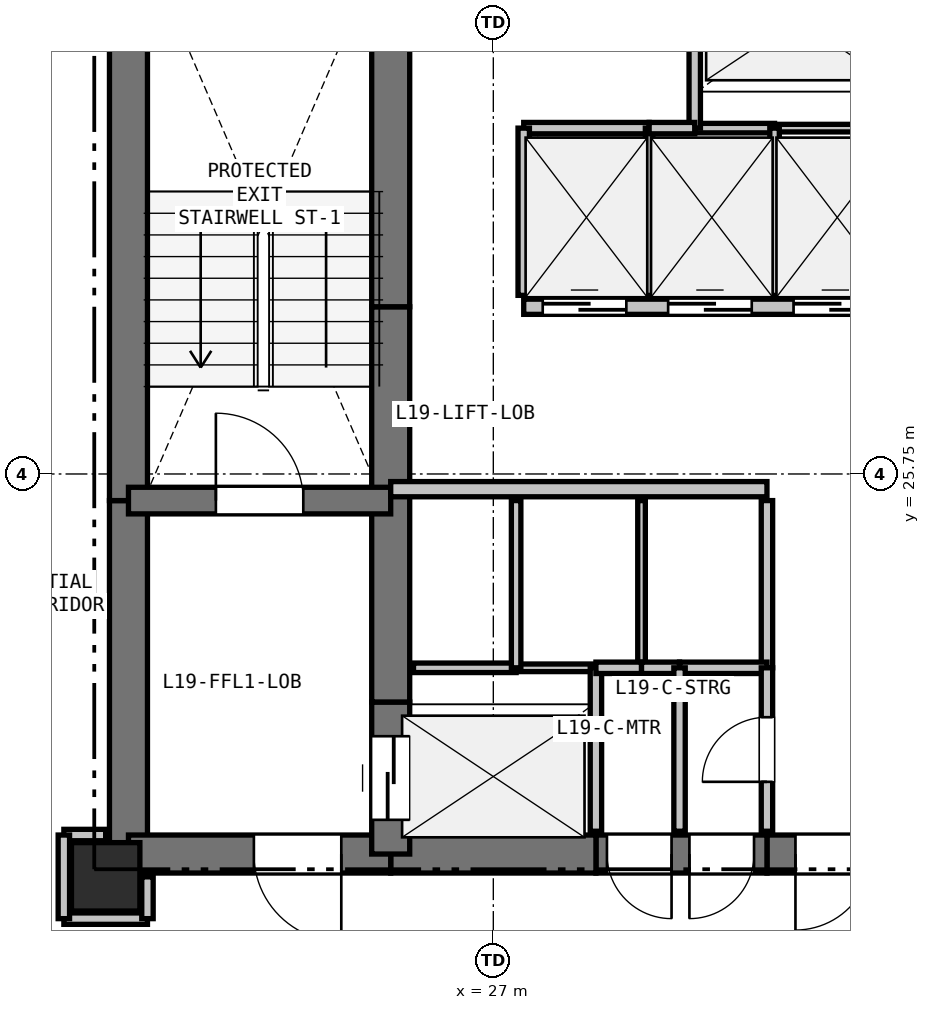
"""IFC4 building model, lengths in metres.
Left out: names, types, materials, properties, quantities, classifications, styles, units other than length and angle.
Written with IfcOpenShell. Run it as: python <this file> out.ifc"""

import sys

from ifc_helpers import new_model, si_unit, direction, frame, frame_2d, origin, origin_2d, place, context, subcontext, project, spatial, rectangle, extrude, element, fill, save


model = new_model("IFC4")
c1 = context("Model", 3, precision=1e-05, world=origin(), true_north=direction((0.0, 1.0)))
c2 = subcontext(c1, "Body", "Model", "MODEL_VIEW")
j1 = project(units=[si_unit("LENGTHUNIT", "METRE"), si_unit("PLANEANGLEUNIT", "RADIAN")], contexts=[c1])
p1 = place(None, origin())
s1 = spatial("IfcSite", under=j1, at=p1, CompositionType="ELEMENT")
p2 = place(p1, origin())
s2 = spatial("IfcBuilding", under=s1, at=p2, CompositionType="ELEMENT")
p3 = place(p2, frame((0.0, 0.0, 73.5)))
s3 = spatial("IfcBuildingStorey", under=s2, at=p3, CompositionType="ELEMENT", Elevation=73.5)
p4 = place(p3, frame((21.9, 20.45, 0.0), z_axis=(0.0, 0.0, 1.0), x_axis=(1.0, 0.0, 0.0)))
e1 = element("IfcColumn", 1, at=p4, inside=s3, PredefinedType="COLUMN", context=c2, shape_type="SweptSolid", body=[
    extrude(rectangle(XDim=0.9, YDim=0.9, at=origin_2d()), origin(), (0.0, 0.0, 1.0), 3.3),
])
p5 = place(p3, frame((22.2, 20.75, 0.0), z_axis=(0.0, 0.0, 1.0), x_axis=(0.0, 1.0, 0.0)))
e2 = element("IfcWall", 2, at=p5, inside=s3, PredefinedType="SHEAR", context=c2, shape_type="SweptSolid", body=[
    extrude(rectangle(XDim=4.65, YDim=0.5, at=frame_2d((2.325, 0.0))), origin(), (0.0, 0.0, 1.0), 3.05),
])
p6 = place(p3, frame((22.2, 25.4, 0.0), z_axis=(0.0, 0.0, 1.0), x_axis=(0.0, 1.0, 0.0)))
e3 = element("IfcWall", 3, at=p6, inside=s3, PredefinedType="SHEAR", context=c2, shape_type="SweptSolid", body=[
    extrude(rectangle(XDim=7.35, YDim=0.5, at=frame_2d((3.675, 0.0))), origin(), (0.0, 0.0, 1.0), 3.05),
])
p7 = place(p3, frame((32.35, 20.75, 0.0), z_axis=(0.0, 0.0, 1.0), x_axis=(-1.0, 0.0, 0.0)))
e4 = element("IfcWall", 4, at=p7, inside=s3, PredefinedType="SHEAR", context=c2, shape_type="SweptSolid", body=[
    extrude(rectangle(XDim=1.75, YDim=0.5, at=frame_2d((0.875, 0.0))), origin(), (0.0, 0.0, 1.0), 3.05),
])
p8 = place(p7, frame((0.375, 0.0, 0.0)))
e5 = element("IfcOpeningElement", 5, at=p8, cuts=e4, PredefinedType="OPENING", context=c2, shape_type="SweptSolid", body=[
    extrude(rectangle(XDim=1.0, YDim=2.15, at=frame_2d((0.5, 1.075))), frame((0.0, 0.26, 0.0), z_axis=(0.0, -1.0, 0.0), x_axis=(1.0, 0.0, 0.0)), (0.0, 0.0, 1.0), 0.52),
])
p9 = place(p3, frame((30.6, 20.75, 0.0), z_axis=(0.0, 0.0, 1.0), x_axis=(-1.0, 0.0, 0.0)))
e6 = element("IfcWall", 6, at=p9, inside=s3, PredefinedType="SHEAR", context=c2, shape_type="SweptSolid", body=[
    extrude(rectangle(XDim=2.25, YDim=0.5, at=frame_2d((1.125, 0.0))), origin(), (0.0, 0.0, 1.0), 3.05),
])
p10 = place(p9, frame((1.255, 0.0, 0.0)))
e7 = element("IfcOpeningElement", 7, at=p10, cuts=e6, PredefinedType="OPENING", context=c2, shape_type="SweptSolid", body=[
    extrude(rectangle(XDim=0.85, YDim=2.1, at=frame_2d((0.425, 1.05))), frame((0.0, 0.26, 0.0), z_axis=(0.0, -1.0, 0.0), x_axis=(1.0, 0.0, 0.0)), (0.0, 0.0, 1.0), 0.52),
])
p11 = place(p9, frame((0.17, 0.0, 0.0)))
e8 = element("IfcOpeningElement", 8, at=p11, cuts=e6, PredefinedType="OPENING", context=c2, shape_type="SweptSolid", body=[
    extrude(rectangle(XDim=0.85, YDim=2.1, at=frame_2d((0.425, 1.05))), frame((0.0, 0.26, 0.0), z_axis=(0.0, -1.0, 0.0), x_axis=(1.0, 0.0, 0.0)), (0.0, 0.0, 1.0), 0.52),
])
p12 = place(p3, frame((28.35, 20.75, 0.0), z_axis=(0.0, 0.0, 1.0), x_axis=(-1.0, 0.0, 0.0)))
e9 = element("IfcWall", 9, at=p12, inside=s3, PredefinedType="SHEAR", context=c2, shape_type="SweptSolid", body=[
    extrude(rectangle(XDim=2.7, YDim=0.5, at=frame_2d((1.35, 0.0))), origin(), (0.0, 0.0, 1.0), 3.05),
])
p13 = place(p3, frame((25.65, 20.75, 0.0), z_axis=(0.0, 0.0, 1.0), x_axis=(-1.0, 0.0, 0.0)))
e10 = element("IfcWall", 10, at=p13, inside=s3, PredefinedType="SHEAR", context=c2, shape_type="SweptSolid", body=[
    extrude(rectangle(XDim=3.45, YDim=0.5, at=frame_2d((1.725, 0.0))), origin(), (0.0, 0.0, 1.0), 3.05),
])
p14 = place(p13, frame((0.65, 0.0, 0.0)))
e11 = element("IfcOpeningElement", 11, at=p14, cuts=e10, PredefinedType="OPENING", context=c2, shape_type="SweptSolid", body=[
    extrude(rectangle(XDim=1.15, YDim=2.15, at=frame_2d((0.575, 1.075))), frame((0.0, 0.26, 0.0), z_axis=(0.0, -1.0, 0.0), x_axis=(1.0, 0.0, 0.0)), (0.0, 0.0, 1.0), 0.52),
])
p15 = place(p3, frame((25.65, 20.75, 0.0), z_axis=(0.0, 0.0, 1.0), x_axis=(0.0, 1.0, 0.0)))
e12 = element("IfcWall", 12, at=p15, inside=s3, PredefinedType="SHEAR", context=c2, shape_type="SweptSolid", body=[
    extrude(rectangle(XDim=2.0, YDim=0.5, at=frame_2d((1.0, 0.0))), origin(), (0.0, 0.0, 1.0), 3.05),
])
p16 = place(p15, frame((0.45, 0.0, 0.0)))
e13 = element("IfcOpeningElement", 13, at=p16, cuts=e12, PredefinedType="OPENING", context=c2, shape_type="SweptSolid", body=[
    extrude(rectangle(XDim=1.1, YDim=2.15, at=frame_2d((0.55, 1.075))), frame((0.0, 0.26, 0.0), z_axis=(0.0, -1.0, 0.0), x_axis=(1.0, 0.0, 0.0)), (0.0, 0.0, 1.0), 0.52),
])
p17 = place(p3, frame((25.65, 22.75, 0.0), z_axis=(0.0, 0.0, 1.0), x_axis=(0.0, 1.0, 0.0)))
e14 = element("IfcWall", 14, at=p17, inside=s3, PredefinedType="SHEAR", context=c2, shape_type="SweptSolid", body=[
    extrude(rectangle(XDim=2.8, YDim=0.5, at=frame_2d((1.4, 0.0))), origin(), (0.0, 0.0, 1.0), 3.05),
])
p18 = place(p3, frame((25.65, 25.55, 0.0), z_axis=(0.0, 0.0, 1.0), x_axis=(0.0, 1.0, 0.0)))
e15 = element("IfcWall", 15, at=p18, inside=s3, PredefinedType="SHEAR", context=c2, shape_type="SweptSolid", body=[
    extrude(rectangle(XDim=2.4, YDim=0.5, at=frame_2d((1.2, 0.0))), origin(), (0.0, 0.0, 1.0), 3.05),
])
p19 = place(p3, frame((25.65, 27.95, 0.0), z_axis=(0.0, 0.0, 1.0), x_axis=(0.0, 1.0, 0.0)))
e16 = element("IfcWall", 16, at=p19, inside=s3, PredefinedType="SHEAR", context=c2, shape_type="SweptSolid", body=[
    extrude(rectangle(XDim=4.8, YDim=0.5, at=frame_2d((2.4, 0.0))), origin(), (0.0, 0.0, 1.0), 3.05),
])
p20 = place(p3, frame((22.2, 25.4, 0.0), z_axis=(0.0, 0.0, 1.0), x_axis=(1.0, 0.0, 0.0)))
e17 = element("IfcWall", 17, at=p20, inside=s3, PredefinedType="SHEAR", context=c2, shape_type="SweptSolid", body=[
    extrude(rectangle(XDim=3.45, YDim=0.35, at=frame_2d((1.725, 0.0))), origin(), (0.0, 0.0, 1.0), 3.05),
])
p21 = place(p20, frame((1.15, 0.0, 0.0)))
e18 = element("IfcOpeningElement", 18, at=p21, cuts=e17, PredefinedType="OPENING", context=c2, shape_type="SweptSolid", body=[
    extrude(rectangle(XDim=1.15, YDim=2.15, at=frame_2d((0.575, 1.075))), frame((0.0, 0.185, 0.0), z_axis=(0.0, -1.0, 0.0), x_axis=(1.0, 0.0, 0.0)), (0.0, 0.0, 1.0), 0.37),
])
p22 = place(p3, frame((25.65, 25.55, 0.0), z_axis=(0.0, 0.0, 1.0), x_axis=(1.0, 0.0, 0.0)))
e19 = element("IfcWall", 19, at=p22, inside=s3, PredefinedType="PARTITIONING", context=c2, shape_type="SweptSolid", body=[
    extrude(rectangle(XDim=4.95, YDim=0.2, at=frame_2d((2.475, 0.0))), origin(), (0.0, 0.0, 1.0), 3.05),
])
p23 = place(p3, frame((27.4, 27.95, 0.0), z_axis=(0.0, 0.0, 1.0), x_axis=(1.0, 0.0, 0.0)))
e20 = element("IfcWall", 20, at=p23, inside=s3, PredefinedType="PARTITIONING", context=c2, shape_type="SweptSolid", body=[
    extrude(rectangle(XDim=4.95, YDim=0.2, at=frame_2d((2.475, 0.0))), origin(), (0.0, 0.0, 1.0), 3.05),
])
p24 = place(p23, frame((0.25, 0.0, 0.0)))
e21 = element("IfcOpeningElement", 21, at=p24, cuts=e20, PredefinedType="OPENING", context=c2, shape_type="SweptSolid", body=[
    extrude(rectangle(XDim=1.1, YDim=2.15, at=frame_2d((0.55, 1.075))), frame((0.0, 0.11, 0.0), z_axis=(0.0, -1.0, 0.0), x_axis=(1.0, 0.0, 0.0)), (0.0, 0.0, 1.0), 0.22),
])
p25 = place(p23, frame((1.9, 0.0, 0.0)))
e22 = element("IfcOpeningElement", 22, at=p25, cuts=e20, PredefinedType="OPENING", context=c2, shape_type="SweptSolid", body=[
    extrude(rectangle(XDim=1.1, YDim=2.15, at=frame_2d((0.55, 1.075))), frame((0.0, 0.11, 0.0), z_axis=(0.0, -1.0, 0.0), x_axis=(1.0, 0.0, 0.0)), (0.0, 0.0, 1.0), 0.22),
])
p26 = place(p23, frame((3.55, 0.0, 0.0)))
e23 = element("IfcOpeningElement", 23, at=p26, cuts=e20, PredefinedType="OPENING", context=c2, shape_type="SweptSolid", body=[
    extrude(rectangle(XDim=1.1, YDim=2.15, at=frame_2d((0.55, 1.075))), frame((0.0, 0.11, 0.0), z_axis=(0.0, -1.0, 0.0), x_axis=(1.0, 0.0, 0.0)), (0.0, 0.0, 1.0), 0.22),
])
p27 = place(p3, frame((25.95, 23.2, 0.0), z_axis=(0.0, 0.0, 1.0), x_axis=(1.0, 0.0, 0.0)))
e24 = element("IfcWall", 24, at=p27, inside=s3, PredefinedType="PARTITIONING", context=c2, shape_type="SweptSolid", body=[
    extrude(rectangle(XDim=1.35, YDim=0.125, at=frame_2d((0.675, 0.0))), origin(), (0.0, 0.0, 1.0), 3.05),
])
p28 = place(p3, frame((27.3, 23.2, 0.0), z_axis=(0.0, 0.0, 1.0), x_axis=(1.0, 0.0, 0.0)))
e25 = element("IfcWall", 25, at=p28, inside=s3, PredefinedType="PARTITIONING", context=c2, shape_type="SweptSolid", body=[
    extrude(rectangle(XDim=1.05, YDim=0.1, at=frame_2d((0.525, 0.0))), origin(), (0.0, 0.0, 1.0), 3.05),
])
p29 = place(p3, frame((28.35, 23.2, 0.0), z_axis=(0.0, 0.0, 1.0), x_axis=(0.0, -1.0, 0.0)))
e26 = element("IfcWall", 26, at=p29, inside=s3, PredefinedType="PARTITIONING", context=c2, shape_type="SweptSolid", body=[
    extrude(rectangle(XDim=2.15, YDim=0.15, at=frame_2d((1.075, 0.0))), origin(), (0.0, 0.0, 1.0), 3.05),
])
p30 = place(p3, frame((32.05, 30.3, 0.0), z_axis=(0.0, 0.0, 1.0), x_axis=(-1.0, 0.0, 0.0)))
e27 = element("IfcWall", 27, at=p30, inside=s3, PredefinedType="PARTITIONING", context=c2, shape_type="SweptSolid", body=[
    extrude(rectangle(XDim=1.35, YDim=0.1, at=frame_2d((0.675, 0.0))), origin(), (0.0, 0.0, 1.0), 3.05),
])
p31 = place(p3, frame((30.7, 30.3, 0.0), z_axis=(0.0, 0.0, 1.0), x_axis=(-1.0, 0.0, 0.0)))
e28 = element("IfcWall", 28, at=p31, inside=s3, PredefinedType="PARTITIONING", context=c2, shape_type="SweptSolid", body=[
    extrude(rectangle(XDim=1.05, YDim=0.125, at=frame_2d((0.525, 0.0))), origin(), (0.0, 0.0, 1.0), 3.05),
])
p32 = place(p3, frame((29.65, 30.3, 0.0), z_axis=(0.0, 0.0, 1.0), x_axis=(0.0, 1.0, 0.0)))
e29 = element("IfcWall", 29, at=p32, inside=s3, PredefinedType="PARTITIONING", context=c2, shape_type="SweptSolid", body=[
    extrude(rectangle(XDim=2.15, YDim=0.15, at=frame_2d((1.075, 0.0))), origin(), (0.0, 0.0, 1.0), 3.05),
])
p33 = place(p3, frame((27.3, 25.4, 0.0), z_axis=(0.0, 0.0, 1.0), x_axis=(0.0, -1.0, 0.0)))
e30 = element("IfcWall", 30, at=p33, inside=s3, PredefinedType="PARTITIONING", context=c2, shape_type="SweptSolid", body=[
    extrude(rectangle(XDim=2.2, YDim=0.125, at=frame_2d((1.1, 0.0))), origin(), (0.0, 0.0, 1.0), 3.05),
])
p34 = place(p3, frame((28.95, 25.4, 0.0), z_axis=(0.0, 0.0, 1.0), x_axis=(0.0, -1.0, 0.0)))
e31 = element("IfcWall", 31, at=p34, inside=s3, PredefinedType="PARTITIONING", context=c2, shape_type="SweptSolid", body=[
    extrude(rectangle(XDim=2.2, YDim=0.1, at=frame_2d((1.1, 0.0))), origin(), (0.0, 0.0, 1.0), 3.05),
])
p35 = place(p3, frame((28.95, 23.2, 0.0), z_axis=(0.0, 0.0, 1.0), x_axis=(-1.0, 0.0, 0.0)))
e32 = element("IfcWall", 32, at=p35, inside=s3, PredefinedType="PARTITIONING", context=c2, shape_type="SweptSolid", body=[
    extrude(rectangle(XDim=0.6, YDim=0.15, at=frame_2d((0.3, 0.0))), origin(), (0.0, 0.0, 1.0), 3.05),
])
p36 = place(p3, frame((30.6, 25.4, 0.0), z_axis=(0.0, 0.0, 1.0), x_axis=(0.0, -1.0, 0.0)))
e33 = element("IfcWall", 33, at=p36, inside=s3, PredefinedType="PARTITIONING", context=c2, shape_type="SweptSolid", body=[
    extrude(rectangle(XDim=2.2, YDim=0.15, at=frame_2d((1.1, 0.0))), origin(), (0.0, 0.0, 1.0), 3.05),
])
p37 = place(p3, frame((30.6, 23.2, 0.0), z_axis=(0.0, 0.0, 1.0), x_axis=(-1.0, 0.0, 0.0)))
e34 = element("IfcWall", 34, at=p37, inside=s3, PredefinedType="PARTITIONING", context=c2, shape_type="SweptSolid", body=[
    extrude(rectangle(XDim=1.15, YDim=0.15, at=frame_2d((0.575, 0.0))), origin(), (0.0, 0.0, 1.0), 3.05),
])
p38 = place(p3, frame((29.45, 23.2, 0.0), z_axis=(0.0, 0.0, 1.0), x_axis=(-1.0, 0.0, 0.0)))
e35 = element("IfcWall", 35, at=p38, inside=s3, PredefinedType="PARTITIONING", context=c2, shape_type="SweptSolid", body=[
    extrude(rectangle(XDim=0.5, YDim=0.15, at=frame_2d((0.25, 0.0))), origin(), (0.0, 0.0, 1.0), 3.05),
])
p39 = place(p3, frame((27.4, 30.3, 0.0), z_axis=(0.0, 0.0, 1.0), x_axis=(1.0, 0.0, 0.0)))
e36 = element("IfcWall", 36, at=p39, inside=s3, PredefinedType="PARTITIONING", context=c2, shape_type="SweptSolid", body=[
    extrude(rectangle(XDim=1.65, YDim=0.15, at=frame_2d((0.825, 0.0))), origin(), (0.0, 0.0, 1.0), 3.05),
])
p40 = place(p3, frame((29.05, 30.3, 0.0), z_axis=(0.0, 0.0, 1.0), x_axis=(0.0, -1.0, 0.0)))
e37 = element("IfcWall", 37, at=p40, inside=s3, PredefinedType="PARTITIONING", context=c2, shape_type="SweptSolid", body=[
    extrude(rectangle(XDim=2.2, YDim=0.1, at=frame_2d((1.1, 0.0))), origin(), (0.0, 0.0, 1.0), 3.05),
])
p41 = place(p3, frame((27.4, 28.1, 0.0), z_axis=(0.0, 0.0, 1.0), x_axis=(0.0, 1.0, 0.0)))
e38 = element("IfcWall", 38, at=p41, inside=s3, PredefinedType="PARTITIONING", context=c2, shape_type="SweptSolid", body=[
    extrude(rectangle(XDim=2.2, YDim=0.15, at=frame_2d((1.1, 0.0))), origin(), (0.0, 0.0, 1.0), 3.05),
])
p42 = place(p3, frame((29.05, 30.3, 0.0), z_axis=(0.0, 0.0, 1.0), x_axis=(1.0, 0.0, 0.0)))
e39 = element("IfcWall", 39, at=p42, inside=s3, PredefinedType="PARTITIONING", context=c2, shape_type="SweptSolid", body=[
    extrude(rectangle(XDim=0.6, YDim=0.15, at=frame_2d((0.3, 0.0))), origin(), (0.0, 0.0, 1.0), 3.05),
])
p43 = place(p3, frame((30.7, 30.3, 0.0), z_axis=(0.0, 0.0, 1.0), x_axis=(0.0, -1.0, 0.0)))
e40 = element("IfcWall", 40, at=p43, inside=s3, PredefinedType="PARTITIONING", context=c2, shape_type="SweptSolid", body=[
    extrude(rectangle(XDim=2.2, YDim=0.125, at=frame_2d((1.1, 0.0))), origin(), (0.0, 0.0, 1.0), 3.05),
])
p44 = place(p3, frame((30.6, 21.05, 0.0), z_axis=(0.0, 0.0, 1.0), x_axis=(0.0, 1.0, 0.0)))
e41 = element("IfcWall", 41, at=p44, inside=s3, PredefinedType="PARTITIONING", context=c2, shape_type="SweptSolid", body=[
    extrude(rectangle(XDim=2.15, YDim=0.15, at=frame_2d((1.075, 0.0))), origin(), (0.0, 0.0, 1.0), 3.05),
])
p45 = place(p44, frame((0.65, 0.0, 0.0)))
e42 = element("IfcOpeningElement", 42, at=p45, cuts=e41, PredefinedType="OPENING", context=c2, shape_type="SweptSolid", body=[
    extrude(rectangle(XDim=0.85, YDim=2.1, at=frame_2d((0.425, 1.05))), frame((0.0, 0.085, 0.0), z_axis=(0.0, -1.0, 0.0), x_axis=(1.0, 0.0, 0.0)), (0.0, 0.0, 1.0), 0.17),
])
p46 = place(p3, frame((21.35, 19.9, 0.0), z_axis=(0.0, 0.0, 1.0), x_axis=(1.0, 0.0, 0.0)))
e43 = element("IfcWall", 43, at=p46, inside=s3, PredefinedType="PARTITIONING", context=c2, shape_type="SweptSolid", body=[
    extrude(rectangle(XDim=1.1, YDim=0.15, at=frame_2d((0.55, 0.0))), origin(), (0.0, 0.0, 1.0), 2.423),
])
p47 = place(p3, frame((22.45, 19.9, 0.0), z_axis=(0.0, 0.0, 1.0), x_axis=(0.0, 1.0, 0.0)))
e44 = element("IfcWall", 44, at=p47, inside=s3, PredefinedType="PARTITIONING", context=c2, shape_type="SweptSolid", body=[
    extrude(rectangle(XDim=0.55, YDim=0.15, at=frame_2d((0.275, 0.0))), origin(), (0.0, 0.0, 1.0), 2.423),
])
p48 = place(p3, frame((21.9, 21.0, 0.0), z_axis=(0.0, 0.0, 1.0), x_axis=(-1.0, 0.0, 0.0)))
e45 = element("IfcWall", 45, at=p48, inside=s3, PredefinedType="PARTITIONING", context=c2, shape_type="SweptSolid", body=[
    extrude(rectangle(XDim=0.55, YDim=0.15, at=frame_2d((0.275, 0.0))), origin(), (0.0, 0.0, 1.0), 2.498),
])
p49 = place(p3, frame((21.35, 21.0, 0.0), z_axis=(0.0, 0.0, 1.0), x_axis=(0.0, -1.0, 0.0)))
e46 = element("IfcWall", 46, at=p49, inside=s3, PredefinedType="PARTITIONING", context=c2, shape_type="SweptSolid", body=[
    extrude(rectangle(XDim=1.1, YDim=0.15, at=frame_2d((0.55, 0.0))), origin(), (0.0, 0.0, 1.0), 2.423),
])
p50 = place(p3, frame((29.45, 23.2, 0.0), z_axis=(0.0, 0.0, 1.0), x_axis=(0.0, -1.0, 0.0)))
e47 = element("IfcWall", 47, at=p50, inside=s3, PredefinedType="PARTITIONING", context=c2, shape_type="SweptSolid", body=[
    extrude(rectangle(XDim=2.15, YDim=0.15, at=frame_2d((1.075, 0.0))), origin(), (0.0, 0.0, 1.0), 3.05),
])
p51 = place(p24, origin())
e48 = element("IfcDoor", 48, at=p51, inside=s3, OperationType="SLIDING_TO_LEFT", PredefinedType="DOOR", context=c2, shape_type="SweptSolid", body=[
    extrude(rectangle(XDim=1.1, YDim=2.15, at=frame_2d((0.55, 1.075))), frame((0.0, 0.025, 0.0), z_axis=(0.0, -1.0, 0.0), x_axis=(1.0, 0.0, 0.0)), (0.0, 0.0, 1.0), 0.05),
])
fill(e21, e48)
p52 = place(p25, origin())
e49 = element("IfcDoor", 49, at=p52, inside=s3, OperationType="SLIDING_TO_LEFT", PredefinedType="DOOR", context=c2, shape_type="SweptSolid", body=[
    extrude(rectangle(XDim=1.1, YDim=2.15, at=frame_2d((0.55, 1.075))), frame((0.0, 0.025, 0.0), z_axis=(0.0, -1.0, 0.0), x_axis=(1.0, 0.0, 0.0)), (0.0, 0.0, 1.0), 0.05),
])
fill(e22, e49)
p53 = place(p26, origin())
e50 = element("IfcDoor", 50, at=p53, inside=s3, OperationType="SLIDING_TO_LEFT", PredefinedType="DOOR", context=c2, shape_type="SweptSolid", body=[
    extrude(rectangle(XDim=1.1, YDim=2.15, at=frame_2d((0.55, 1.075))), frame((0.0, 0.025, 0.0), z_axis=(0.0, -1.0, 0.0), x_axis=(1.0, 0.0, 0.0)), (0.0, 0.0, 1.0), 0.05),
])
fill(e23, e50)
p54 = place(p8, origin())
e51 = element("IfcDoor", 51, at=p54, inside=s3, OperationType="SINGLE_SWING_RIGHT", PredefinedType="DOOR", context=c2, shape_type="SweptSolid", body=[
    extrude(rectangle(XDim=1.0, YDim=2.15, at=frame_2d((0.5, 1.075))), frame((0.0, 0.025, 0.0), z_axis=(0.0, -1.0, 0.0), x_axis=(1.0, 0.0, 0.0)), (0.0, 0.0, 1.0), 0.05),
])
fill(e5, e51)
p55 = place(p16, origin())
e52 = element("IfcDoor", 52, at=p55, inside=s3, OperationType="SLIDING_TO_LEFT", PredefinedType="DOOR", context=c2, shape_type="SweptSolid", body=[
    extrude(rectangle(XDim=1.1, YDim=2.15, at=frame_2d((0.55, 1.075))), frame((0.0, 0.025, 0.0), z_axis=(0.0, -1.0, 0.0), x_axis=(1.0, 0.0, 0.0)), (0.0, 0.0, 1.0), 0.05),
])
fill(e13, e52)
p56 = place(p21, origin())
e53 = element("IfcDoor", 53, at=p56, inside=s3, OperationType="SINGLE_SWING_LEFT", PredefinedType="DOOR", context=c2, shape_type="SweptSolid", body=[
    extrude(rectangle(XDim=1.15, YDim=2.15, at=frame_2d((0.575, 1.075))), frame((0.0, 0.025, 0.0), z_axis=(0.0, -1.0, 0.0), x_axis=(1.0, 0.0, 0.0)), (0.0, 0.0, 1.0), 0.05),
])
fill(e18, e53)
p57 = place(p14, origin())
e54 = element("IfcDoor", 54, at=p57, inside=s3, OperationType="SINGLE_SWING_LEFT", PredefinedType="DOOR", context=c2, shape_type="SweptSolid", body=[
    extrude(rectangle(XDim=1.15, YDim=2.15, at=frame_2d((0.575, 1.075))), frame((0.0, 0.025, 0.0), z_axis=(0.0, -1.0, 0.0), x_axis=(1.0, 0.0, 0.0)), (0.0, 0.0, 1.0), 0.05),
])
fill(e11, e54)
p58 = place(p45, origin())
e55 = element("IfcDoor", 55, at=p58, inside=s3, OperationType="SINGLE_SWING_LEFT", PredefinedType="DOOR", context=c2, shape_type="SweptSolid", body=[
    extrude(rectangle(XDim=0.85, YDim=2.1, at=frame_2d((0.425, 1.05))), frame((0.0, 0.025, 0.0), z_axis=(0.0, -1.0, 0.0), x_axis=(1.0, 0.0, 0.0)), (0.0, 0.0, 1.0), 0.05),
])
fill(e42, e55)
p59 = place(p10, origin())
e56 = element("IfcDoor", 56, at=p59, inside=s3, OperationType="SINGLE_SWING_LEFT", PredefinedType="DOOR", context=c2, shape_type="SweptSolid", body=[
    extrude(rectangle(XDim=0.85, YDim=2.1, at=frame_2d((0.425, 1.05))), frame((0.0, 0.025, 0.0), z_axis=(0.0, -1.0, 0.0), x_axis=(1.0, 0.0, 0.0)), (0.0, 0.0, 1.0), 0.05),
])
fill(e7, e56)
p60 = place(p11, origin())
e57 = element("IfcDoor", 57, at=p60, inside=s3, OperationType="SINGLE_SWING_RIGHT", PredefinedType="DOOR", context=c2, shape_type="SweptSolid", body=[
    extrude(rectangle(XDim=0.85, YDim=2.1, at=frame_2d((0.425, 1.05))), frame((0.0, 0.025, 0.0), z_axis=(0.0, -1.0, 0.0), x_axis=(1.0, 0.0, 0.0)), (0.0, 0.0, 1.0), 0.05),
])
fill(e8, e57)
save(model, sys.argv[1])
